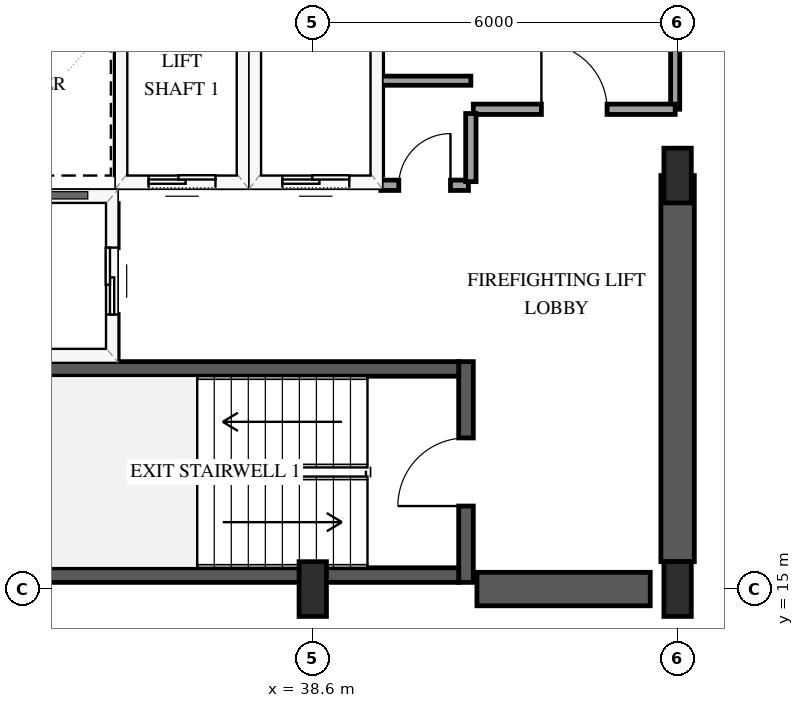
"""IFC4 building model, lengths in metres.
Left out: names, types, materials, properties, quantities, classifications, styles, units other than length and angle.
Written with IfcOpenShell. Run it as: python <this file> out.ifc"""

import sys

from ifc_helpers import new_model, si_unit, direction, frame, frame_2d, origin, origin_2d, place, context, subcontext, project, spatial, rectangle, extrude, element, fill, save


model = new_model("IFC4")
c1 = context("Model", 3, precision=1e-05, world=origin(), true_north=direction((0.0, 1.0)))
c2 = subcontext(c1, "Body", "Model", "MODEL_VIEW")
j1 = project(units=[si_unit("LENGTHUNIT", "METRE"), si_unit("PLANEANGLEUNIT", "RADIAN")], contexts=[c1])
p1 = place(None, origin())
s1 = spatial("IfcSite", under=j1, at=p1, CompositionType="ELEMENT")
p2 = place(p1, origin())
s2 = spatial("IfcBuilding", under=s1, at=p2, CompositionType="ELEMENT")
p3 = place(p2, frame((0.0, 0.0, 122.5)))
s3 = spatial("IfcBuildingStorey", under=s2, at=p3, CompositionType="ELEMENT", Elevation=122.5)
p4 = place(p3, frame((41.12, 15.11, 0.0), z_axis=(0.0, 0.0, 1.0), x_axis=(0.0, 1.0, 0.0)))
e1 = element("IfcWall", 1, at=p4, inside=s3, PredefinedType="SHEAR", context=c2, shape_type="SweptSolid", body=[
    extrude(rectangle(XDim=3.63, YDim=0.24, at=frame_2d((1.815, 0.0))), origin(), (0.0, 0.0, 1.0), 3.9),
])
p5 = place(p4, frame((1.255, 0.0, 0.0)))
e2 = element("IfcOpeningElement", 2, at=p5, cuts=e1, PredefinedType="OPENING", context=c2, shape_type="SweptSolid", body=[
    extrude(rectangle(XDim=1.12, YDim=2.15, at=frame_2d((0.56, 1.075))), frame((0.0, 0.13, 0.0), z_axis=(0.0, -1.0, 0.0), x_axis=(1.0, 0.0, 0.0)), (0.0, 0.0, 1.0), 0.26),
])
for number, where, z_axis, x_axis in (
    (3, (33.0, 15.23, 0.0), (0.0, 0.0, 1.0), (1.0, 0.0, 0.0)),
    (4, (33.0, 18.62, 0.0), (0.0, 0.0, 1.0), (1.0, 0.0, 0.0)),
):
    element("IfcWall", number, at=place(p3, frame(where, z_axis=z_axis, x_axis=x_axis)), inside=s3, PredefinedType="SHEAR", context=c2, shape_type="SweptSolid", body=[
        extrude(rectangle(XDim=8.0, YDim=0.24, at=frame_2d((4.0, 0.0))), origin(), (0.0, 0.0, 1.0), 3.9),
    ])
p6 = place(p3, frame((41.3, 15.0, 0.0), z_axis=(0.0, 0.0, 1.0), x_axis=(1.0, 0.0, 0.0)))
e5 = element("IfcWall", 5, at=p6, inside=s3, PredefinedType="SHEAR", context=c2, shape_type="SweptSolid", body=[
    extrude(rectangle(XDim=2.85, YDim=0.55, at=frame_2d((1.425, 0.0))), origin(), (0.0, 0.0, 1.0), 3.9),
])
p7 = place(p3, frame((44.6, 15.45, 0.0), z_axis=(0.0, 0.0, 1.0), x_axis=(0.0, 1.0, 0.0)))
e6 = element("IfcWall", 6, at=p7, inside=s3, PredefinedType="SHEAR", context=c2, shape_type="SweptSolid", body=[
    extrude(rectangle(XDim=6.35, YDim=0.55, at=frame_2d((3.175, 0.0))), origin(), (0.0, 0.0, 1.0), 3.9),
])
for number, where, z_axis, x_axis in (
    (7, (38.6, 15.0, 0.0), (0.0, 0.0, 1.0), (1.0, 0.0, 0.0)),
    (8, (44.6, 15.0, 0.0), (0.0, 0.0, 1.0), (1.0, 0.0, 0.0)),
    (9, (44.6, 21.8, 0.0), (0.0, 0.0, 1.0), (1.0, 0.0, 0.0)),
):
    element("IfcColumn", number, at=place(p3, frame(where, z_axis=z_axis, x_axis=x_axis)), inside=s3, PredefinedType="PILASTER", context=c2, shape_type="SweptSolid", body=[
        extrude(rectangle(XDim=0.45, YDim=0.9, at=origin_2d()), origin(), (0.0, 0.0, 1.0), 3.9),
    ])
p8 = place(p3, frame((35.45, 21.7, 0.0), z_axis=(0.0, 0.0, 1.0), x_axis=(1.0, 0.0, 0.0)))
e10 = element("IfcWall", 10, at=p8, inside=s3, PredefinedType="SOLIDWALL", context=c2, shape_type="SweptSolid", body=[
    extrude(rectangle(XDim=2.0, YDim=0.2, at=frame_2d((1.0, 0.0))), origin(), (0.0, 0.0, 1.0), 3.6),
])
p9 = place(p8, frame((0.45, 0.0, 0.0)))
e11 = element("IfcOpeningElement", 11, at=p9, cuts=e10, PredefinedType="OPENING", context=c2, shape_type="SweptSolid", body=[
    extrude(rectangle(XDim=1.1, YDim=2.15, at=frame_2d((0.55, 1.075))), frame((0.0, 0.11, 0.0), z_axis=(0.0, -1.0, 0.0), x_axis=(1.0, 0.0, 0.0)), (0.0, 0.0, 1.0), 0.22),
])
for number, where, z_axis, x_axis in (
    (12, (35.45, 21.81, 0.0), (0.0, 0.0, 1.0), (0.0, 1.0, 0.0)),
    (13, (37.45, 21.81, 0.0), (0.0, 0.0, 1.0), (0.0, 1.0, 0.0)),
):
    element("IfcWall", number, at=place(p3, frame(where, z_axis=z_axis, x_axis=x_axis)), inside=s3, PredefinedType="SOLIDWALL", context=c2, shape_type="SweptSolid", body=[
        extrude(rectangle(XDim=2.38, YDim=0.2, at=frame_2d((1.19, 0.0))), origin(), (0.0, 0.0, 1.0), 3.6),
    ])
p10 = place(p3, frame((37.65, 21.7, 0.0), z_axis=(0.0, 0.0, 1.0), x_axis=(1.0, 0.0, 0.0)))
e14 = element("IfcWall", 14, at=p10, inside=s3, PredefinedType="SOLIDWALL", context=c2, shape_type="SweptSolid", body=[
    extrude(rectangle(XDim=2.0, YDim=0.2, at=frame_2d((1.0, 0.0))), origin(), (0.0, 0.0, 1.0), 3.6),
])
p11 = place(p10, frame((0.45, 0.0, 0.0)))
e15 = element("IfcOpeningElement", 15, at=p11, cuts=e14, PredefinedType="OPENING", context=c2, shape_type="SweptSolid", body=[
    extrude(rectangle(XDim=1.1, YDim=2.15, at=frame_2d((0.55, 1.075))), frame((0.0, 0.11, 0.0), z_axis=(0.0, -1.0, 0.0), x_axis=(1.0, 0.0, 0.0)), (0.0, 0.0, 1.0), 0.22),
])
p12 = place(p3, frame((39.65, 21.81, 0.0), z_axis=(0.0, 0.0, 1.0), x_axis=(0.0, 1.0, 0.0)))
e16 = element("IfcWall", 16, at=p12, inside=s3, PredefinedType="SOLIDWALL", context=c2, shape_type="SweptSolid", body=[
    extrude(rectangle(XDim=2.38, YDim=0.2, at=frame_2d((1.19, 0.0))), origin(), (0.0, 0.0, 1.0), 3.6),
])
p13 = place(p3, frame((32.72, 21.45, 0.0), z_axis=(0.0, 0.0, 1.0), x_axis=(1.0, 0.0, 0.0)))
e17 = element("IfcWall", 17, at=p13, inside=s3, PredefinedType="SOLIDWALL", context=c2, shape_type="SweptSolid", body=[
    extrude(rectangle(XDim=2.58, YDim=0.2, at=frame_2d((1.29, 0.0))), origin(), (0.0, 0.0, 1.0), 3.6),
])
p14 = place(p3, frame((35.3, 18.79, 0.0), z_axis=(0.0, 0.0, 1.0), x_axis=(0.0, 1.0, 0.0)))
e18 = element("IfcWall", 18, at=p14, inside=s3, PredefinedType="SOLIDWALL", context=c2, shape_type="SweptSolid", body=[
    extrude(rectangle(XDim=2.55, YDim=0.2, at=frame_2d((1.275, 0.0))), origin(), (0.0, 0.0, 1.0), 3.6),
])
p15 = place(p14, frame((0.725, 0.0, 0.0)))
e19 = element("IfcOpeningElement", 19, at=p15, cuts=e18, PredefinedType="OPENING", context=c2, shape_type="SweptSolid", body=[
    extrude(rectangle(XDim=1.1, YDim=2.15, at=frame_2d((0.55, 1.075))), frame((0.0, 0.11, 0.0), z_axis=(0.0, -1.0, 0.0), x_axis=(1.0, 0.0, 0.0)), (0.0, 0.0, 1.0), 0.22),
])
p16 = place(p3, frame((44.56, 29.8, 0.0), z_axis=(0.0, 0.0, 1.0), x_axis=(0.0, -1.0, 0.0)))
e20 = element("IfcWall", 20, at=p16, inside=s3, PredefinedType="PARTITIONING", context=c2, shape_type="SweptSolid", body=[
    extrude(rectangle(XDim=6.91, YDim=0.15, at=frame_2d((3.455, 0.0))), origin(), (0.0, 0.0, 1.0), 2.64),
])
p17 = place(p16, frame((2.915, 0.0, 0.0)))
e21 = element("IfcOpeningElement", 21, at=p17, cuts=e20, PredefinedType="OPENING", context=c2, shape_type="SweptSolid", body=[
    extrude(rectangle(XDim=1.08, YDim=2.15, at=frame_2d((0.54, 1.075))), frame((0.0, 0.085, 0.0), z_axis=(0.0, -1.0, 0.0), x_axis=(1.0, 0.0, 0.0)), (0.0, 0.0, 1.0), 0.17),
])
p18 = place(p3, frame((41.24, 22.89, 0.0), z_axis=(0.0, 0.0, 1.0), x_axis=(1.0, 0.0, 0.0)))
e22 = element("IfcWall", 22, at=p18, inside=s3, PredefinedType="PARTITIONING", context=c2, shape_type="SweptSolid", body=[
    extrude(rectangle(XDim=3.32, YDim=0.17, at=frame_2d((1.66, 0.0))), origin(), (0.0, 0.0, 1.0), 3.6),
])
p19 = place(p18, frame((1.12, 0.0, 0.0)))
e23 = element("IfcOpeningElement", 23, at=p19, cuts=e22, PredefinedType="OPENING", context=c2, shape_type="SweptSolid", body=[
    extrude(rectangle(XDim=1.08, YDim=2.15, at=frame_2d((0.54, 1.075))), frame((0.0, 0.095, 0.0), z_axis=(0.0, -1.0, 0.0), x_axis=(1.0, 0.0, 0.0)), (0.0, 0.0, 1.0), 0.19),
])
p20 = place(p3, frame((39.72, 21.64, 0.0), z_axis=(0.0, 0.0, 1.0), x_axis=(1.0, 0.0, 0.0)))
e24 = element("IfcWall", 24, at=p20, inside=s3, PredefinedType="PARTITIONING", context=c2, shape_type="SweptSolid", body=[
    extrude(rectangle(XDim=1.44, YDim=0.17, at=frame_2d((0.72, 0.0))), origin(), (0.0, 0.0, 1.0), 3.6),
])
p21 = place(p20, frame((0.295, 0.0, 0.0)))
e25 = element("IfcOpeningElement", 25, at=p21, cuts=e24, PredefinedType="OPENING", context=c2, shape_type="SweptSolid", body=[
    extrude(rectangle(XDim=0.85, YDim=2.1, at=frame_2d((0.425, 1.05))), frame((0.0, 0.095, 0.0), z_axis=(0.0, -1.0, 0.0), x_axis=(1.0, 0.0, 0.0)), (0.0, 0.0, 1.0), 0.19),
])
p22 = place(p3, frame((41.2, 21.7, 0.0), z_axis=(0.0, 0.0, 1.0), x_axis=(0.0, 1.0, 0.0)))
e26 = element("IfcWall", 26, at=p22, inside=s3, PredefinedType="PARTITIONING", context=c2, shape_type="SweptSolid", body=[
    extrude(rectangle(XDim=1.12, YDim=0.17, at=frame_2d((0.56, 0.0))), origin(), (0.0, 0.0, 1.0), 3.6),
])
p23 = place(p3, frame((41.2, 23.36, 0.0), z_axis=(0.0, 0.0, 1.0), x_axis=(-1.0, 0.0, 0.0)))
e27 = element("IfcWall", 27, at=p23, inside=s3, PredefinedType="PARTITIONING", context=c2, shape_type="SweptSolid", body=[
    extrude(rectangle(XDim=1.48, YDim=0.15, at=frame_2d((0.74, 0.0))), origin(), (0.0, 0.0, 1.0), 3.6),
])
p24 = place(p9, origin())
e28 = element("IfcDoor", 28, at=p24, inside=s3, OperationType="SLIDING_TO_LEFT", PredefinedType="DOOR", context=c2, shape_type="SweptSolid", body=[
    extrude(rectangle(XDim=1.1, YDim=2.15, at=frame_2d((0.55, 1.075))), frame((0.0, 0.025, 0.0), z_axis=(0.0, -1.0, 0.0), x_axis=(1.0, 0.0, 0.0)), (0.0, 0.0, 1.0), 0.05),
])
fill(e11, e28)
p25 = place(p11, origin())
e29 = element("IfcDoor", 29, at=p25, inside=s3, OperationType="SLIDING_TO_LEFT", PredefinedType="DOOR", context=c2, shape_type="SweptSolid", body=[
    extrude(rectangle(XDim=1.1, YDim=2.15, at=frame_2d((0.55, 1.075))), frame((0.0, 0.025, 0.0), z_axis=(0.0, -1.0, 0.0), x_axis=(1.0, 0.0, 0.0)), (0.0, 0.0, 1.0), 0.05),
])
fill(e15, e29)
p26 = place(p15, origin())
e30 = element("IfcDoor", 30, at=p26, inside=s3, OperationType="SLIDING_TO_LEFT", PredefinedType="DOOR", context=c2, shape_type="SweptSolid", body=[
    extrude(rectangle(XDim=1.1, YDim=2.15, at=frame_2d((0.55, 1.075))), frame((0.0, 0.025, 0.0), z_axis=(0.0, -1.0, 0.0), x_axis=(1.0, 0.0, 0.0)), (0.0, 0.0, 1.0), 0.05),
])
fill(e19, e30)
p27 = place(p5, origin())
e31 = element("IfcDoor", 31, at=p27, inside=s3, OperationType="SINGLE_SWING_LEFT", PredefinedType="DOOR", context=c2, shape_type="SweptSolid", body=[
    extrude(rectangle(XDim=1.12, YDim=2.15, at=frame_2d((0.56, 1.075))), frame((0.0, 0.025, 0.0), z_axis=(0.0, -1.0, 0.0), x_axis=(1.0, 0.0, 0.0)), (0.0, 0.0, 1.0), 0.05),
])
fill(e2, e31)
p28 = place(p19, origin())
e32 = element("IfcDoor", 32, at=p28, inside=s3, OperationType="SINGLE_SWING_LEFT", PredefinedType="DOOR", context=c2, shape_type="SweptSolid", body=[
    extrude(rectangle(XDim=1.08, YDim=2.15, at=frame_2d((0.54, 1.075))), frame((0.0, 0.025, 0.0), z_axis=(0.0, -1.0, 0.0), x_axis=(1.0, 0.0, 0.0)), (0.0, 0.0, 1.0), 0.05),
])
fill(e23, e32)
p29 = place(p21, origin())
e33 = element("IfcDoor", 33, at=p29, inside=s3, OperationType="SINGLE_SWING_RIGHT", PredefinedType="DOOR", context=c2, shape_type="SweptSolid", body=[
    extrude(rectangle(XDim=0.85, YDim=2.1, at=frame_2d((0.425, 1.05))), frame((0.0, 0.025, 0.0), z_axis=(0.0, -1.0, 0.0), x_axis=(1.0, 0.0, 0.0)), (0.0, 0.0, 1.0), 0.05),
])
fill(e25, e33)
save(model, sys.argv[1])
